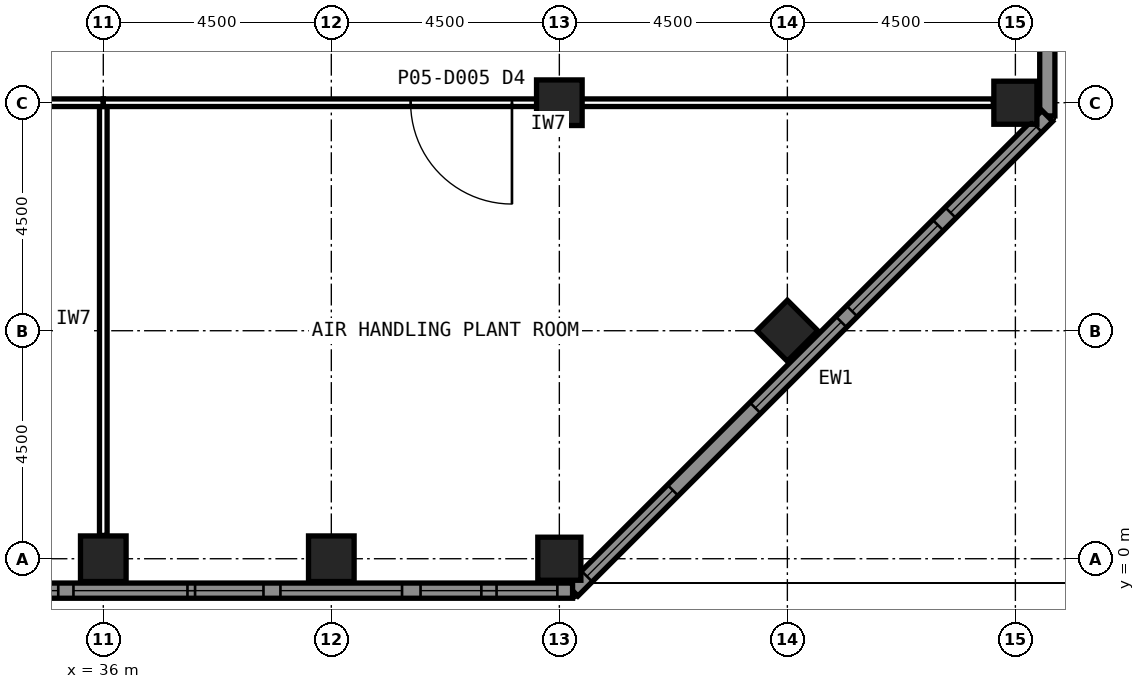
"""IFC4 building model, lengths in metres.
Left out: names, types, materials, properties, quantities, classifications, styles, units other than length and angle.
Written with IfcOpenShell. Run it as: python <this file> out.ifc"""

import sys

from ifc_helpers import new_model, si_unit, direction, frame, frame_2d, origin, origin_2d, place, context, subcontext, project, spatial, rectangle, hollow_rectangle, extrude, element, fill, save


model = new_model("IFC4")
c1 = context("Model", 3, precision=1e-05, world=origin(), true_north=direction((0.0, 1.0)))
c2 = subcontext(c1, "Body", "Model", "MODEL_VIEW")
j1 = project(units=[si_unit("LENGTHUNIT", "METRE"), si_unit("PLANEANGLEUNIT", "RADIAN")], contexts=[c1])
p1 = place(None, origin())
s1 = spatial("IfcSite", under=j1, at=p1, CompositionType="ELEMENT")
p2 = place(p1, origin())
s2 = spatial("IfcBuilding", under=s1, at=p2, CompositionType="ELEMENT")
p3 = place(p2, frame((0.0, 0.0, 23.0)))
s3 = spatial("IfcBuildingStorey", under=s2, at=p3, CompositionType="ELEMENT", Elevation=23.0)
for number, where, z_axis, x_axis in (
    (1, (36.0, 0.0, 0.0), (0.0, 0.0, 1.0), (1.0, 0.0, 0.0)),
    (2, (40.5, 0.0, 0.0), (0.0, 0.0, 1.0), (1.0, 0.0, 0.0)),
):
    element("IfcColumn", number, at=place(p3, frame(where, z_axis=z_axis, x_axis=x_axis)), inside=s3, PredefinedType="COLUMN", context=c2, shape_type="SweptSolid", body=[
        extrude(hollow_rectangle(XDim=0.9, YDim=0.9, WallThickness=0.063, at=origin_2d()), origin(), (0.0, 0.0, 1.0), 6.0),
    ])
for number, where, z_axis, x_axis in (
    (3, (45.0, 0.0, 0.0), (0.0, 0.0, 1.0), (1.0, 0.0, 0.0)),
    (4, (54.0, 9.0, 0.0), (0.0, 0.0, 1.0), (1.0, 0.0, 0.0)),
    (5, (49.5, 4.5, 0.0), (0.0, 0.0, 1.0), (0.707, 0.707, 0.0)),
):
    element("IfcColumn", number, at=place(p3, frame(where, z_axis=z_axis, x_axis=x_axis)), inside=s3, PredefinedType="COLUMN", context=c2, shape_type="SweptSolid", body=[
        extrude(hollow_rectangle(XDim=0.85, YDim=0.85, WallThickness=0.05, at=origin_2d()), origin(), (0.0, 0.0, 1.0), 6.0),
    ])
p4 = place(p3, frame((45.0, 9.0, 0.0), z_axis=(0.0, 0.0, 1.0), x_axis=(1.0, 0.0, 0.0)))
e6 = element("IfcColumn", 6, at=p4, inside=s3, PredefinedType="COLUMN", context=c2, shape_type="SweptSolid", body=[
    extrude(hollow_rectangle(XDim=0.9, YDim=0.9, WallThickness=0.063, at=origin_2d()), origin(), (0.0, 0.0, 1.0), 6.0),
])
p5 = place(p3, frame((54.63, 45.261, 0.0), z_axis=(0.0, 0.0, 1.0), x_axis=(0.0, -1.0, 0.0)))
e7 = element("IfcWall", 7, at=p5, inside=s3, PredefinedType="SOLIDWALL", context=c2, shape_type="SweptSolid", body=[
    extrude(rectangle(XDim=36.522, YDim=0.3, at=frame_2d((18.261, 0.0))), origin(), (0.0, 0.0, 1.0), 6.0),
])
p6 = place(p5, frame((19.511, 0.0, 0.0)))
e8 = element("IfcOpeningElement", 8, at=p6, cuts=e7, PredefinedType="OPENING", context=c2, shape_type="SweptSolid", body=[
    extrude(rectangle(XDim=1.0, YDim=2.1, at=frame_2d((0.5, 1.05))), frame((0.0, 0.16, 0.0), z_axis=(0.0, -1.0, 0.0), x_axis=(1.0, 0.0, 0.0)), (0.0, 0.0, 1.0), 0.32),
])
p7 = place(p5, frame((0.3, 0.0, 0.3)))
e9 = element("IfcOpeningElement", 9, at=p7, cuts=e7, PredefinedType="OPENING", context=c2, shape_type="SweptSolid", body=[
    extrude(rectangle(XDim=1.5, YDim=2.0, at=frame_2d((0.75, 1.0))), frame((0.0, 0.16, 0.0), z_axis=(0.0, -1.0, 0.0), x_axis=(1.0, 0.0, 0.0)), (0.0, 0.0, 1.0), 0.32),
])
p8 = place(p5, frame((3.365, 0.0, 1.2)))
e10 = element("IfcOpeningElement", 10, at=p8, cuts=e7, PredefinedType="OPENING", context=c2, shape_type="SweptSolid", body=[
    extrude(rectangle(XDim=2.4, YDim=3.0, at=frame_2d((1.2, 1.5))), frame((0.0, 0.16, 0.0), z_axis=(0.0, -1.0, 0.0), x_axis=(1.0, 0.0, 0.0)), (0.0, 0.0, 1.0), 0.32),
])
p9 = place(p5, frame((1.5, 0.0, 3.65)))
e11 = element("IfcOpeningElement", 11, at=p9, cuts=e7, PredefinedType="OPENING", context=c2, shape_type="SweptSolid", body=[
    extrude(rectangle(XDim=1.5, YDim=2.0, at=frame_2d((0.75, 1.0))), frame((0.0, 0.16, 0.0), z_axis=(0.0, -1.0, 0.0), x_axis=(1.0, 0.0, 0.0)), (0.0, 0.0, 1.0), 0.32),
])
p10 = place(p5, frame((6.1, 0.0, 3.6)))
e12 = element("IfcOpeningElement", 12, at=p10, cuts=e7, PredefinedType="OPENING", context=c2, shape_type="SweptSolid", body=[
    extrude(rectangle(XDim=1.5, YDim=2.0, at=frame_2d((0.75, 1.0))), frame((0.0, 0.16, 0.0), z_axis=(0.0, -1.0, 0.0), x_axis=(1.0, 0.0, 0.0)), (0.0, 0.0, 1.0), 0.32),
])
p11 = place(p5, frame((12.496, 0.0, 1.2)))
e13 = element("IfcOpeningElement", 13, at=p11, cuts=e7, PredefinedType="OPENING", context=c2, shape_type="SweptSolid", body=[
    extrude(rectangle(XDim=2.4, YDim=3.0, at=frame_2d((1.2, 1.5))), frame((0.0, 0.16, 0.0), z_axis=(0.0, -1.0, 0.0), x_axis=(1.0, 0.0, 0.0)), (0.0, 0.0, 1.0), 0.32),
])
p12 = place(p5, frame((7.45, 0.0, 0.3)))
e14 = element("IfcOpeningElement", 14, at=p12, cuts=e7, PredefinedType="OPENING", context=c2, shape_type="SweptSolid", body=[
    extrude(rectangle(XDim=2.4, YDim=3.0, at=frame_2d((1.2, 1.5))), frame((0.0, 0.16, 0.0), z_axis=(0.0, -1.0, 0.0), x_axis=(1.0, 0.0, 0.0)), (0.0, 0.0, 1.0), 0.32),
])
p13 = place(p5, frame((21.626, 0.0, 1.2)))
e15 = element("IfcOpeningElement", 15, at=p13, cuts=e7, PredefinedType="OPENING", context=c2, shape_type="SweptSolid", body=[
    extrude(rectangle(XDim=2.4, YDim=3.0, at=frame_2d((1.2, 1.5))), frame((0.0, 0.16, 0.0), z_axis=(0.0, -1.0, 0.0), x_axis=(1.0, 0.0, 0.0)), (0.0, 0.0, 1.0), 0.32),
])
p14 = place(p5, frame((10.15, 0.0, 0.3)))
e16 = element("IfcOpeningElement", 16, at=p14, cuts=e7, PredefinedType="OPENING", context=c2, shape_type="SweptSolid", body=[
    extrude(rectangle(XDim=1.5, YDim=2.0, at=frame_2d((0.75, 1.0))), frame((0.0, 0.16, 0.0), z_axis=(0.0, -1.0, 0.0), x_axis=(1.0, 0.0, 0.0)), (0.0, 0.0, 1.0), 0.32),
])
p15 = place(p5, frame((16.45, 0.0, 0.3)))
e17 = element("IfcOpeningElement", 17, at=p15, cuts=e7, PredefinedType="OPENING", context=c2, shape_type="SweptSolid", body=[
    extrude(rectangle(XDim=2.4, YDim=3.0, at=frame_2d((1.2, 1.5))), frame((0.0, 0.16, 0.0), z_axis=(0.0, -1.0, 0.0), x_axis=(1.0, 0.0, 0.0)), (0.0, 0.0, 1.0), 0.32),
])
p16 = place(p5, frame((30.757, 0.0, 1.2)))
e18 = element("IfcOpeningElement", 18, at=p16, cuts=e7, PredefinedType="OPENING", context=c2, shape_type="SweptSolid", body=[
    extrude(rectangle(XDim=2.4, YDim=3.0, at=frame_2d((1.2, 1.5))), frame((0.0, 0.16, 0.0), z_axis=(0.0, -1.0, 0.0), x_axis=(1.0, 0.0, 0.0)), (0.0, 0.0, 1.0), 0.32),
])
p17 = place(p5, frame((25.45, 0.0, 0.3)))
e19 = element("IfcOpeningElement", 19, at=p17, cuts=e7, PredefinedType="OPENING", context=c2, shape_type="SweptSolid", body=[
    extrude(rectangle(XDim=2.4, YDim=3.0, at=frame_2d((1.2, 1.5))), frame((0.0, 0.16, 0.0), z_axis=(0.0, -1.0, 0.0), x_axis=(1.0, 0.0, 0.0)), (0.0, 0.0, 1.0), 0.32),
])
p18 = place(p3, frame((54.63, 8.739, 0.0), z_axis=(0.0, 0.0, 1.0), x_axis=(-0.707106781187, -0.707106781187, 0.0)))
e20 = element("IfcWall", 20, at=p18, inside=s3, PredefinedType="SOLIDWALL", context=c2, shape_type="SweptSolid", body=[
    extrude(rectangle(XDim=13.25, YDim=0.3, at=frame_2d((6.625, 0.0))), origin(), (0.0, 0.0, 1.0), 6.0),
])
p19 = place(p18, frame((0.3, 0.0, 0.3)))
e21 = element("IfcOpeningElement", 21, at=p19, cuts=e20, PredefinedType="OPENING", context=c2, shape_type="SweptSolid", body=[
    extrude(rectangle(XDim=2.4, YDim=3.0, at=frame_2d((1.2, 1.5))), frame((0.0, 0.16, 0.0), z_axis=(0.0, -1.0, 0.0), x_axis=(1.0, 0.0, 0.0)), (0.0, 0.0, 1.0), 0.32),
])
p20 = place(p18, frame((3.05, 0.0, 2.7)))
e22 = element("IfcOpeningElement", 22, at=p20, cuts=e20, PredefinedType="OPENING", context=c2, shape_type="SweptSolid", body=[
    extrude(rectangle(XDim=2.4, YDim=3.0, at=frame_2d((1.2, 1.5))), frame((0.0, 0.16, 0.0), z_axis=(0.0, -1.0, 0.0), x_axis=(1.0, 0.0, 0.0)), (0.0, 0.0, 1.0), 0.32),
])
p21 = place(p18, frame((5.75, 0.0, 0.75)))
e23 = element("IfcOpeningElement", 23, at=p21, cuts=e20, PredefinedType="OPENING", context=c2, shape_type="SweptSolid", body=[
    extrude(rectangle(XDim=2.4, YDim=3.0, at=frame_2d((1.2, 1.5))), frame((0.0, 0.16, 0.0), z_axis=(0.0, -1.0, 0.0), x_axis=(1.0, 0.0, 0.0)), (0.0, 0.0, 1.0), 0.32),
])
p22 = place(p18, frame((10.45, 0.0, 0.3)))
e24 = element("IfcOpeningElement", 24, at=p22, cuts=e20, PredefinedType="OPENING", context=c2, shape_type="SweptSolid", body=[
    extrude(rectangle(XDim=2.4, YDim=3.0, at=frame_2d((1.2, 1.5))), frame((0.0, 0.16, 0.0), z_axis=(0.0, -1.0, 0.0), x_axis=(1.0, 0.0, 0.0)), (0.0, 0.0, 1.0), 0.32),
])
p23 = place(p3, frame((45.261, -0.63, 0.0), z_axis=(0.0, 0.0, 1.0), x_axis=(-1.0, 0.0, 0.0)))
e25 = element("IfcWall", 25, at=p23, inside=s3, PredefinedType="SOLIDWALL", context=c2, shape_type="SweptSolid", body=[
    extrude(rectangle(XDim=36.522, YDim=0.3, at=frame_2d((18.261, 0.0))), origin(), (0.0, 0.0, 1.0), 6.0),
])
p24 = place(p23, frame((0.3, 0.0, 0.3)))
e26 = element("IfcOpeningElement", 26, at=p24, cuts=e25, PredefinedType="OPENING", context=c2, shape_type="SweptSolid", body=[
    extrude(rectangle(XDim=1.5, YDim=2.0, at=frame_2d((0.75, 1.0))), frame((0.0, 0.16, 0.0), z_axis=(0.0, -1.0, 0.0), x_axis=(1.0, 0.0, 0.0)), (0.0, 0.0, 1.0), 0.32),
])
p25 = place(p23, frame((3.365, 0.0, 1.2)))
e27 = element("IfcOpeningElement", 27, at=p25, cuts=e25, PredefinedType="OPENING", context=c2, shape_type="SweptSolid", body=[
    extrude(rectangle(XDim=2.4, YDim=3.0, at=frame_2d((1.2, 1.5))), frame((0.0, 0.16, 0.0), z_axis=(0.0, -1.0, 0.0), x_axis=(1.0, 0.0, 0.0)), (0.0, 0.0, 1.0), 0.32),
])
p26 = place(p23, frame((1.5, 0.0, 3.65)))
e28 = element("IfcOpeningElement", 28, at=p26, cuts=e25, PredefinedType="OPENING", context=c2, shape_type="SweptSolid", body=[
    extrude(rectangle(XDim=1.5, YDim=2.0, at=frame_2d((0.75, 1.0))), frame((0.0, 0.16, 0.0), z_axis=(0.0, -1.0, 0.0), x_axis=(1.0, 0.0, 0.0)), (0.0, 0.0, 1.0), 0.32),
])
p27 = place(p23, frame((6.1, 0.0, 3.6)))
e29 = element("IfcOpeningElement", 29, at=p27, cuts=e25, PredefinedType="OPENING", context=c2, shape_type="SweptSolid", body=[
    extrude(rectangle(XDim=1.5, YDim=2.0, at=frame_2d((0.75, 1.0))), frame((0.0, 0.16, 0.0), z_axis=(0.0, -1.0, 0.0), x_axis=(1.0, 0.0, 0.0)), (0.0, 0.0, 1.0), 0.32),
])
p28 = place(p23, frame((12.496, 0.0, 1.2)))
e30 = element("IfcOpeningElement", 30, at=p28, cuts=e25, PredefinedType="OPENING", context=c2, shape_type="SweptSolid", body=[
    extrude(rectangle(XDim=2.4, YDim=3.0, at=frame_2d((1.2, 1.5))), frame((0.0, 0.16, 0.0), z_axis=(0.0, -1.0, 0.0), x_axis=(1.0, 0.0, 0.0)), (0.0, 0.0, 1.0), 0.32),
])
p29 = place(p23, frame((7.45, 0.0, 0.3)))
e31 = element("IfcOpeningElement", 31, at=p29, cuts=e25, PredefinedType="OPENING", context=c2, shape_type="SweptSolid", body=[
    extrude(rectangle(XDim=2.4, YDim=3.0, at=frame_2d((1.2, 1.5))), frame((0.0, 0.16, 0.0), z_axis=(0.0, -1.0, 0.0), x_axis=(1.0, 0.0, 0.0)), (0.0, 0.0, 1.0), 0.32),
])
p30 = place(p23, frame((10.15, 0.0, 0.3)))
e32 = element("IfcOpeningElement", 32, at=p30, cuts=e25, PredefinedType="OPENING", context=c2, shape_type="SweptSolid", body=[
    extrude(rectangle(XDim=1.5, YDim=2.0, at=frame_2d((0.75, 1.0))), frame((0.0, 0.16, 0.0), z_axis=(0.0, -1.0, 0.0), x_axis=(1.0, 0.0, 0.0)), (0.0, 0.0, 1.0), 0.32),
])
p31 = place(p23, frame((21.626, 0.0, 1.2)))
e33 = element("IfcOpeningElement", 33, at=p31, cuts=e25, PredefinedType="OPENING", context=c2, shape_type="SweptSolid", body=[
    extrude(rectangle(XDim=2.4, YDim=3.0, at=frame_2d((1.2, 1.5))), frame((0.0, 0.16, 0.0), z_axis=(0.0, -1.0, 0.0), x_axis=(1.0, 0.0, 0.0)), (0.0, 0.0, 1.0), 0.32),
])
p32 = place(p23, frame((10.5, 0.0, 3.65)))
e34 = element("IfcOpeningElement", 34, at=p32, cuts=e25, PredefinedType="OPENING", context=c2, shape_type="SweptSolid", body=[
    extrude(rectangle(XDim=1.5, YDim=2.0, at=frame_2d((0.75, 1.0))), frame((0.0, 0.16, 0.0), z_axis=(0.0, -1.0, 0.0), x_axis=(1.0, 0.0, 0.0)), (0.0, 0.0, 1.0), 0.32),
])
p33 = place(p23, frame((16.45, 0.0, 0.3)))
e35 = element("IfcOpeningElement", 35, at=p33, cuts=e25, PredefinedType="OPENING", context=c2, shape_type="SweptSolid", body=[
    extrude(rectangle(XDim=2.4, YDim=3.0, at=frame_2d((1.2, 1.5))), frame((0.0, 0.16, 0.0), z_axis=(0.0, -1.0, 0.0), x_axis=(1.0, 0.0, 0.0)), (0.0, 0.0, 1.0), 0.32),
])
p34 = place(p23, frame((30.757, 0.0, 1.2)))
e36 = element("IfcOpeningElement", 36, at=p34, cuts=e25, PredefinedType="OPENING", context=c2, shape_type="SweptSolid", body=[
    extrude(rectangle(XDim=2.4, YDim=3.0, at=frame_2d((1.2, 1.5))), frame((0.0, 0.16, 0.0), z_axis=(0.0, -1.0, 0.0), x_axis=(1.0, 0.0, 0.0)), (0.0, 0.0, 1.0), 0.32),
])
p35 = place(p23, frame((25.45, 0.0, 0.3)))
e37 = element("IfcOpeningElement", 37, at=p35, cuts=e25, PredefinedType="OPENING", context=c2, shape_type="SweptSolid", body=[
    extrude(rectangle(XDim=2.4, YDim=3.0, at=frame_2d((1.2, 1.5))), frame((0.0, 0.16, 0.0), z_axis=(0.0, -1.0, 0.0), x_axis=(1.0, 0.0, 0.0)), (0.0, 0.0, 1.0), 0.32),
])
p36 = place(p3, frame((36.0, 0.46, 0.0), z_axis=(0.0, 0.0, 1.0), x_axis=(0.0, 1.0, 0.0)))
e38 = element("IfcWall", 38, at=p36, inside=s3, PredefinedType="PARTITIONING", context=c2, shape_type="SweptSolid", body=[
    extrude(rectangle(XDim=8.54, YDim=0.15, at=frame_2d((4.27, 0.0))), origin(), (0.0, 0.0, 1.0), 4.989),
])
p37 = place(p3, frame((36.0, 9.0, 0.0), z_axis=(0.0, 0.0, 1.0), x_axis=(-1.0, 0.0, 0.0)))
e39 = element("IfcWall", 39, at=p37, inside=s3, PredefinedType="PARTITIONING", context=c2, shape_type="SweptSolid", body=[
    extrude(rectangle(XDim=18.0, YDim=0.15, at=frame_2d((9.0, 0.0))), origin(), (0.0, 0.0, 1.0), 5.84),
])
p38 = place(p37, frame((8.0, 0.0, 0.0)))
e40 = element("IfcOpeningElement", 40, at=p38, cuts=e39, PredefinedType="OPENING", context=c2, shape_type="SweptSolid", body=[
    extrude(rectangle(XDim=2.0, YDim=2.4, at=frame_2d((1.0, 1.2))), frame((0.0, 0.085, 0.0), z_axis=(0.0, -1.0, 0.0), x_axis=(1.0, 0.0, 0.0)), (0.0, 0.0, 1.0), 0.17),
])
p39 = place(p3, frame((53.565, 9.0, 0.0), z_axis=(0.0, 0.0, 1.0), x_axis=(-1.0, 0.0, 0.0)))
e41 = element("IfcWall", 41, at=p39, inside=s3, PredefinedType="PARTITIONING", context=c2, shape_type="SweptSolid", body=[
    extrude(rectangle(XDim=17.565, YDim=0.15, at=frame_2d((8.782, 0.0))), origin(), (0.0, 0.0, 1.0), 5.229),
])
p40 = place(p39, frame((9.5, 0.0, 0.0)))
e42 = element("IfcOpeningElement", 42, at=p40, cuts=e41, PredefinedType="OPENING", context=c2, shape_type="SweptSolid", body=[
    extrude(rectangle(XDim=2.0, YDim=2.4, at=frame_2d((1.0, 1.2))), frame((0.0, 0.085, 0.0), z_axis=(0.0, -1.0, 0.0), x_axis=(1.0, 0.0, 0.0)), (0.0, 0.0, 1.0), 0.17),
])
p41 = place(p19, origin())
e43 = element("IfcWindow", 43, at=p41, inside=s3, PartitioningType="SINGLE_PANEL", PredefinedType="USERDEFINED", context=c2, shape_type="SweptSolid", body=[
    extrude(rectangle(XDim=2.4, YDim=3.0, at=frame_2d((1.2, 1.5))), frame((0.0, 0.03, 0.0), z_axis=(0.0, -1.0, 0.0), x_axis=(1.0, 0.0, 0.0)), (0.0, 0.0, 1.0), 0.06),
])
fill(e21, e43)
p42 = place(p20, origin())
e44 = element("IfcWindow", 44, at=p42, inside=s3, PartitioningType="SINGLE_PANEL", PredefinedType="USERDEFINED", context=c2, shape_type="SweptSolid", body=[
    extrude(rectangle(XDim=2.4, YDim=3.0, at=frame_2d((1.2, 1.5))), frame((0.0, 0.03, 0.0), z_axis=(0.0, -1.0, 0.0), x_axis=(1.0, 0.0, 0.0)), (0.0, 0.0, 1.0), 0.06),
])
fill(e22, e44)
p43 = place(p21, origin())
e45 = element("IfcWindow", 45, at=p43, inside=s3, PartitioningType="SINGLE_PANEL", PredefinedType="USERDEFINED", context=c2, shape_type="SweptSolid", body=[
    extrude(rectangle(XDim=2.4, YDim=3.0, at=frame_2d((1.2, 1.5))), frame((0.0, 0.03, 0.0), z_axis=(0.0, -1.0, 0.0), x_axis=(1.0, 0.0, 0.0)), (0.0, 0.0, 1.0), 0.06),
])
fill(e23, e45)
p44 = place(p22, origin())
e46 = element("IfcWindow", 46, at=p44, inside=s3, PartitioningType="SINGLE_PANEL", PredefinedType="USERDEFINED", context=c2, shape_type="SweptSolid", body=[
    extrude(rectangle(XDim=2.4, YDim=3.0, at=frame_2d((1.2, 1.5))), frame((0.0, 0.03, 0.0), z_axis=(0.0, -1.0, 0.0), x_axis=(1.0, 0.0, 0.0)), (0.0, 0.0, 1.0), 0.06),
])
fill(e24, e46)
p45 = place(p24, origin())
e47 = element("IfcWindow", 47, at=p45, inside=s3, PartitioningType="SINGLE_PANEL", PredefinedType="USERDEFINED", context=c2, shape_type="SweptSolid", body=[
    extrude(rectangle(XDim=1.5, YDim=2.0, at=frame_2d((0.75, 1.0))), frame((0.0, 0.03, 0.0), z_axis=(0.0, -1.0, 0.0), x_axis=(1.0, 0.0, 0.0)), (0.0, 0.0, 1.0), 0.06),
])
fill(e26, e47)
p46 = place(p25, origin())
e48 = element("IfcWindow", 48, at=p46, inside=s3, PartitioningType="SINGLE_PANEL", PredefinedType="USERDEFINED", context=c2, shape_type="SweptSolid", body=[
    extrude(rectangle(XDim=2.4, YDim=3.0, at=frame_2d((1.2, 1.5))), frame((0.0, 0.03, 0.0), z_axis=(0.0, -1.0, 0.0), x_axis=(1.0, 0.0, 0.0)), (0.0, 0.0, 1.0), 0.06),
])
fill(e27, e48)
p47 = place(p26, origin())
e49 = element("IfcWindow", 49, at=p47, inside=s3, PartitioningType="SINGLE_PANEL", PredefinedType="USERDEFINED", context=c2, shape_type="SweptSolid", body=[
    extrude(rectangle(XDim=1.5, YDim=2.0, at=frame_2d((0.75, 1.0))), frame((0.0, 0.03, 0.0), z_axis=(0.0, -1.0, 0.0), x_axis=(1.0, 0.0, 0.0)), (0.0, 0.0, 1.0), 0.06),
])
fill(e28, e49)
p48 = place(p27, origin())
e50 = element("IfcWindow", 50, at=p48, inside=s3, PartitioningType="SINGLE_PANEL", PredefinedType="USERDEFINED", context=c2, shape_type="SweptSolid", body=[
    extrude(rectangle(XDim=1.5, YDim=2.0, at=frame_2d((0.75, 1.0))), frame((0.0, 0.03, 0.0), z_axis=(0.0, -1.0, 0.0), x_axis=(1.0, 0.0, 0.0)), (0.0, 0.0, 1.0), 0.06),
])
fill(e29, e50)
p49 = place(p29, origin())
e51 = element("IfcWindow", 51, at=p49, inside=s3, PartitioningType="SINGLE_PANEL", PredefinedType="USERDEFINED", context=c2, shape_type="SweptSolid", body=[
    extrude(rectangle(XDim=2.4, YDim=3.0, at=frame_2d((1.2, 1.5))), frame((0.0, 0.03, 0.0), z_axis=(0.0, -1.0, 0.0), x_axis=(1.0, 0.0, 0.0)), (0.0, 0.0, 1.0), 0.06),
])
fill(e31, e51)
p50 = place(p30, origin())
e52 = element("IfcWindow", 52, at=p50, inside=s3, PartitioningType="SINGLE_PANEL", PredefinedType="USERDEFINED", context=c2, shape_type="SweptSolid", body=[
    extrude(rectangle(XDim=1.5, YDim=2.0, at=frame_2d((0.75, 1.0))), frame((0.0, 0.03, 0.0), z_axis=(0.0, -1.0, 0.0), x_axis=(1.0, 0.0, 0.0)), (0.0, 0.0, 1.0), 0.06),
])
fill(e32, e52)
p51 = place(p40, origin())
e53 = element("IfcDoor", 53, at=p51, inside=s3, OperationType="SINGLE_SWING_LEFT", PredefinedType="DOOR", context=c2, shape_type="SweptSolid", body=[
    extrude(rectangle(XDim=2.0, YDim=2.4, at=frame_2d((1.0, 1.2))), frame((0.0, 0.025, 0.0), z_axis=(0.0, -1.0, 0.0), x_axis=(1.0, 0.0, 0.0)), (0.0, 0.0, 1.0), 0.05),
])
fill(e42, e53)
save(model, sys.argv[1])
